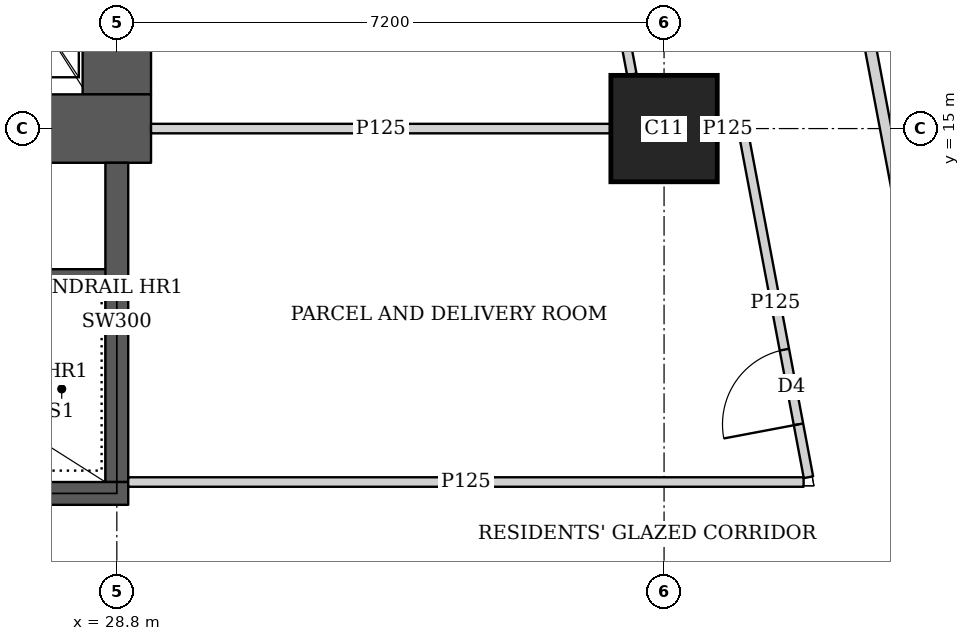
"""IFC4 building model, lengths in metres.
Left out: names, types, materials, properties, quantities, classifications, styles, units other than length and angle.
Written with IfcOpenShell. Run it as: python <this file> out.ifc"""

import sys

from ifc_helpers import new_model, si_unit, direction, frame, frame_2d, origin, origin_2d, place, context, subcontext, project, spatial, rectangle, extrude, element, fill, save


model = new_model("IFC4")
c1 = context("Model", 3, precision=1e-05, world=origin(), true_north=direction((0.0, 1.0)))
c2 = subcontext(c1, "Body", "Model", "MODEL_VIEW")
j1 = project(units=[si_unit("LENGTHUNIT", "METRE"), si_unit("PLANEANGLEUNIT", "RADIAN")], contexts=[c1])
p1 = place(None, origin())
s1 = spatial("IfcSite", under=j1, at=p1, CompositionType="ELEMENT")
p2 = place(p1, origin())
s2 = spatial("IfcBuilding", under=s1, at=p2, CompositionType="ELEMENT")
p3 = place(p2, frame((0.0, 0.0, 223.7)))
s3 = spatial("IfcBuildingStorey", under=s2, at=p3, CompositionType="ELEMENT", Elevation=223.7)
p4 = place(p3, frame((36.0, 15.0, 0.0), z_axis=(0.0, 0.0, 1.0), x_axis=(1.0, 0.0, 0.0)))
e1 = element("IfcColumn", 1, at=p4, inside=s3, PredefinedType="COLUMN", context=c2, shape_type="SweptSolid", body=[
    extrude(rectangle(XDim=1.4, YDim=1.4, at=origin_2d()), origin(), (0.0, 0.0, 1.0), 3.75),
])
p5 = place(p3, frame((13.95, 15.0, 0.0), z_axis=(0.0, 0.0, 1.0), x_axis=(1.0, 0.0, 0.0)))
e2 = element("IfcWall", 2, at=p5, inside=s3, PredefinedType="SHEAR", context=c2, shape_type="SweptSolid", body=[
    extrude(rectangle(XDim=15.3, YDim=0.9, at=frame_2d((7.65, 0.0))), origin(), (0.0, 0.0, 1.0), 3.75),
])
p6 = place(p5, frame((4.45, 0.0, 0.0)))
e3 = element("IfcOpeningElement", 3, at=p6, cuts=e2, PredefinedType="OPENING", context=c2, shape_type="SweptSolid", body=[
    extrude(rectangle(XDim=1.8, YDim=2.1, at=frame_2d((0.9, 1.05))), frame((0.0, 0.46, 0.0), z_axis=(0.0, -1.0, 0.0), x_axis=(1.0, 0.0, 0.0)), (0.0, 0.0, 1.0), 0.92),
])
p7 = place(p5, frame((10.7, 0.0, 0.0)))
e4 = element("IfcOpeningElement", 4, at=p7, cuts=e2, PredefinedType="OPENING", context=c2, shape_type="SweptSolid", body=[
    extrude(rectangle(XDim=1.1, YDim=2.1, at=frame_2d((0.55, 1.05))), frame((0.0, 0.46, 0.0), z_axis=(0.0, -1.0, 0.0), x_axis=(1.0, 0.0, 0.0)), (0.0, 0.0, 1.0), 0.92),
])
p8 = place(p3, frame((28.8, 15.45, 0.0), z_axis=(0.0, 0.0, 1.0), x_axis=(0.0, 1.0, 0.0)))
e5 = element("IfcWall", 5, at=p8, inside=s3, PredefinedType="SHEAR", context=c2, shape_type="SweptSolid", body=[
    extrude(rectangle(XDim=14.1, YDim=0.9, at=frame_2d((7.05, 0.0))), origin(), (0.0, 0.0, 1.0), 3.75),
])
p9 = place(p3, frame((21.45, 10.2, 0.0), z_axis=(0.0, 0.0, 1.0), x_axis=(1.0, 0.0, 0.0)))
e6 = element("IfcWall", 6, at=p9, inside=s3, PredefinedType="SHEAR", context=c2, shape_type="SweptSolid", body=[
    extrude(rectangle(XDim=7.5, YDim=0.3, at=frame_2d((3.75, 0.0))), origin(), (0.0, 0.0, 1.0), 3.75),
])
p10 = place(p9, frame((0.5, 0.0, 0.0)))
e7 = element("IfcOpeningElement", 7, at=p10, cuts=e6, PredefinedType="OPENING", context=c2, shape_type="SweptSolid", body=[
    extrude(rectangle(XDim=1.1, YDim=2.1, at=frame_2d((0.55, 1.05))), frame((0.0, 0.16, 0.0), z_axis=(0.0, -1.0, 0.0), x_axis=(1.0, 0.0, 0.0)), (0.0, 0.0, 1.0), 0.32),
])
p11 = place(p3, frame((28.8, 10.35, 0.0), z_axis=(0.0, 0.0, 1.0), x_axis=(0.0, 1.0, 0.0)))
e8 = element("IfcWall", 8, at=p11, inside=s3, PredefinedType="SHEAR", context=c2, shape_type="SweptSolid", body=[
    extrude(rectangle(XDim=4.2, YDim=0.3, at=frame_2d((2.1, 0.0))), origin(), (0.0, 0.0, 1.0), 3.75),
])
p12 = place(p3, frame((33.68, 42.723, 0.0), z_axis=(0.0, 0.0, 1.0), x_axis=(0.185601160014, -0.982625162207, 0.0)))
e9 = element("IfcWall", 9, at=p12, inside=s3, PredefinedType="SOLIDWALL", context=c2, shape_type="SweptSolid", body=[
    extrude(rectangle(XDim=41.051, YDim=0.15, at=frame_2d((20.526, 0.0))), origin(), (0.0, 0.0, 1.0), 2.5),
])
p13 = place(p12, frame((16.123, 0.0, 0.0)))
e10 = element("IfcOpeningElement", 10, at=p13, cuts=e9, PredefinedType="OPENING", context=c2, shape_type="SweptSolid", body=[
    extrude(rectangle(XDim=1.0, YDim=2.1, at=frame_2d((0.5, 1.05))), frame((0.0, 0.085, 0.0), z_axis=(0.0, -1.0, 0.0), x_axis=(1.0, 0.0, 0.0)), (0.0, 0.0, 1.0), 0.17),
])
p14 = place(p12, frame((19.938, 0.0, 0.0)))
e11 = element("IfcOpeningElement", 11, at=p14, cuts=e9, PredefinedType="OPENING", context=c2, shape_type="SweptSolid", body=[
    extrude(rectangle(XDim=1.0, YDim=2.1, at=frame_2d((0.5, 1.05))), frame((0.0, 0.085, 0.0), z_axis=(0.0, -1.0, 0.0), x_axis=(1.0, 0.0, 0.0)), (0.0, 0.0, 1.0), 0.17),
])
p15 = place(p12, frame((30.902, 0.0, 0.0)))
e12 = element("IfcOpeningElement", 12, at=p15, cuts=e9, PredefinedType="OPENING", context=c2, shape_type="SweptSolid", body=[
    extrude(rectangle(XDim=1.0, YDim=2.1, at=frame_2d((0.5, 1.05))), frame((0.0, 0.085, 0.0), z_axis=(0.0, -1.0, 0.0), x_axis=(1.0, 0.0, 0.0)), (0.0, 0.0, 1.0), 0.17),
])
p16 = place(p3, frame((28.95, 10.35, 0.0), z_axis=(0.0, 0.0, 1.0), x_axis=(1.0, 0.0, 0.0)))
e13 = element("IfcWall", 13, at=p16, inside=s3, PredefinedType="PARTITIONING", context=c2, shape_type="SweptSolid", body=[
    extrude(rectangle(XDim=8.886, YDim=0.125, at=frame_2d((4.443, 0.0))), origin(), (0.0, 0.0, 1.0), 3.5),
])
p17 = place(p3, frame((37.9, 10.413, 0.0), z_axis=(0.0, 0.0, 1.0), x_axis=(-0.185513629891, 0.982641691119, 0.0)))
e14 = element("IfcWall", 14, at=p17, inside=s3, PredefinedType="PARTITIONING", context=c2, shape_type="SweptSolid", body=[
    extrude(rectangle(XDim=4.668, YDim=0.125, at=frame_2d((2.334, 0.0))), origin(), (0.0, 0.0, 1.0), 3.5),
])
p18 = place(p17, frame((0.708, 0.0, 0.0)))
e15 = element("IfcOpeningElement", 15, at=p18, cuts=e14, PredefinedType="OPENING", context=c2, shape_type="SweptSolid", body=[
    extrude(rectangle(XDim=1.0, YDim=2.1, at=frame_2d((0.5, 1.05))), frame((0.0, 0.073, 0.0), z_axis=(0.0, -1.0, 0.0), x_axis=(1.0, 0.0, 0.0)), (0.0, 0.0, 1.0), 0.145),
])
p19 = place(p3, frame((35.576, 15.713, 0.0), z_axis=(0.0, 0.0, 1.0), x_axis=(-0.185602982696, 0.982624817931, 0.0)))
e16 = element("IfcWall", 16, at=p19, inside=s3, PredefinedType="PARTITIONING", context=c2, shape_type="SweptSolid", body=[
    extrude(rectangle(XDim=13.814, YDim=0.125, at=frame_2d((6.907, 0.0))), origin(), (0.0, 0.0, 1.0), 2.5),
])
p20 = place(p19, frame((5.3, 0.0, 0.0)))
e17 = element("IfcOpeningElement", 17, at=p20, cuts=e16, PredefinedType="OPENING", context=c2, shape_type="SweptSolid", body=[
    extrude(rectangle(XDim=1.0, YDim=2.1, at=frame_2d((0.5, 1.05))), frame((0.0, 0.073, 0.0), z_axis=(0.0, -1.0, 0.0), x_axis=(1.0, 0.0, 0.0)), (0.0, 0.0, 1.0), 0.145),
])
p21 = place(p3, frame((29.25, 15.0, 0.0), z_axis=(0.0, 0.0, 1.0), x_axis=(1.0, 0.0, 0.0)))
e18 = element("IfcWall", 18, at=p21, inside=s3, PredefinedType="PARTITIONING", context=c2, shape_type="SweptSolid", body=[
    extrude(rectangle(XDim=6.049, YDim=0.125, at=frame_2d((3.024, 0.0))), origin(), (0.0, 0.0, 1.0), 3.5),
])
p22 = place(p3, frame((36.701, 15.0, 0.0), z_axis=(0.0, 0.0, 1.0), x_axis=(1.0, 0.0, 0.0)))
e19 = element("IfcWall", 19, at=p22, inside=s3, PredefinedType="PARTITIONING", context=c2, shape_type="SweptSolid", body=[
    extrude(rectangle(XDim=0.272, YDim=0.125, at=frame_2d((0.136, 0.0))), origin(), (0.0, 0.0, 1.0), 3.5),
])
p23 = place(p3, frame((23.0, 13.05, 0.0), z_axis=(0.0, 0.0, 1.0), x_axis=(1.0, 0.0, 0.0)))
e20 = element("IfcWall", 20, at=p23, inside=s3, PredefinedType="SHEAR", context=c2, shape_type="SweptSolid", body=[
    extrude(rectangle(XDim=5.8, YDim=0.2, at=frame_2d((2.9, 0.0))), origin(), (0.0, 0.0, 1.0), 3.75),
])
p24 = place(p18, origin())
e21 = element("IfcDoor", 21, at=p24, inside=s3, OperationType="SINGLE_SWING_LEFT", PredefinedType="DOOR", context=c2, shape_type="SweptSolid", body=[
    extrude(rectangle(XDim=1.0, YDim=2.1, at=frame_2d((0.5, 1.05))), frame((0.0, 0.025, 0.0), z_axis=(0.0, -1.0, 0.0), x_axis=(1.0, 0.0, 0.0)), (0.0, 0.0, 1.0), 0.05),
])
fill(e15, e21)
save(model, sys.argv[1])
